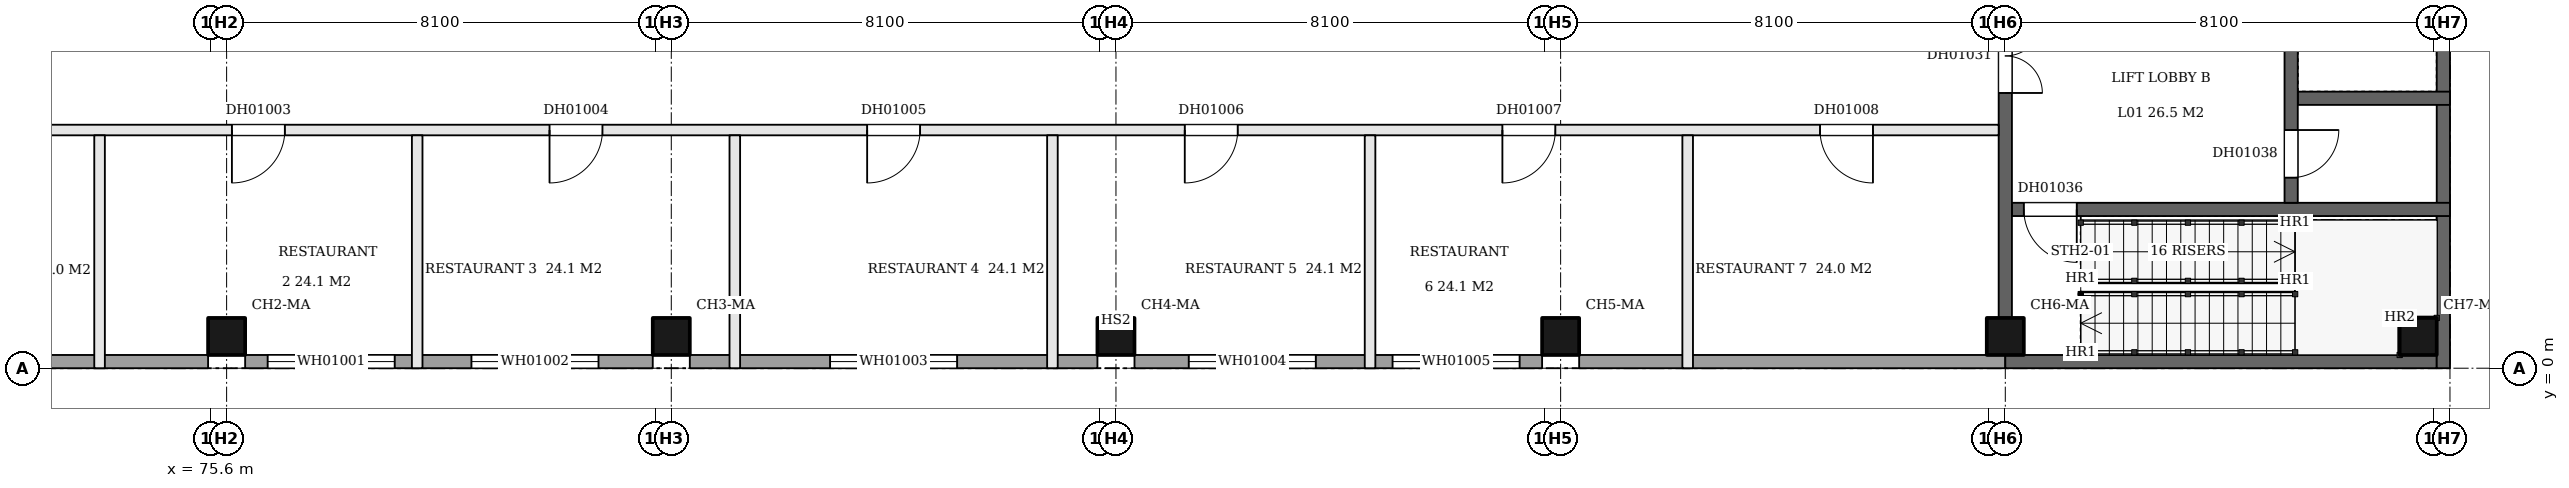
"""IFC4 building model, lengths in metres.
Left out: names, types, materials, properties, quantities, classifications, styles, units other than length and angle.
Written with IfcOpenShell. Run it as: python <this file> out.ifc"""

import sys

from ifc_helpers import new_model, si_unit, direction, frame, frame_2d, origin, origin_2d, place, context, subcontext, project, spatial, rectangle, extrude, element, fill, save


model = new_model("IFC4")
c1 = context("Model", 3, precision=1e-05, world=origin(), true_north=direction((0.0, 1.0)))
c2 = subcontext(c1, "Body", "Model", "MODEL_VIEW")
j1 = project(units=[si_unit("LENGTHUNIT", "METRE"), si_unit("PLANEANGLEUNIT", "RADIAN")], contexts=[c1])
p1 = place(None, origin())
s1 = spatial("IfcSite", under=j1, at=p1, CompositionType="ELEMENT")
p2 = place(p1, origin())
s2 = spatial("IfcBuilding", under=s1, at=p2, CompositionType="ELEMENT")
p3 = place(p2, frame((0.0, 0.0, 9.0)))
s3 = spatial("IfcBuildingStorey", under=s2, at=p3, CompositionType="ELEMENT", Elevation=9.0)
for number, where, z_axis, x_axis in (
    (1, (75.9, 0.6, 0.0), (0.0, 0.0, 1.0), (1.0, 0.0, 0.0)),
    (2, (84.3, 0.6, 0.0), (0.0, 0.0, 1.0), (1.0, 0.0, 0.0)),
    (3, (92.7, 0.6, 0.0), (0.0, 0.0, 1.0), (1.0, 0.0, 0.0)),
    (4, (101.1, 0.6, 0.0), (0.0, 0.0, 1.0), (1.0, 0.0, 0.0)),
    (5, (109.5, 0.6, 0.0), (0.0, 0.0, 1.0), (1.0, 0.0, 0.0)),
    (6, (117.3, 0.6, 0.0), (0.0, 0.0, 1.0), (1.0, 0.0, 0.0)),
):
    element("IfcColumn", number, at=place(p3, frame(where, z_axis=z_axis, x_axis=x_axis)), inside=s3, PredefinedType="COLUMN", context=c2, shape_type="SweptSolid", body=[
        extrude(rectangle(XDim=0.7, YDim=0.7, at=origin_2d()), origin(), (0.0, 0.0, 1.0), 5.1),
    ])
p4 = place(p3, frame((68.35, 0.125, 0.0), z_axis=(0.0, 0.0, 1.0), x_axis=(1.0, 0.0, 0.0)))
e7 = element("IfcWall", 7, at=p4, inside=s3, PredefinedType="SOLIDWALL", context=c2, shape_type="SweptSolid", body=[
    extrude(rectangle(XDim=7.2, YDim=0.25, at=frame_2d((3.6, 0.0))), origin(), (0.0, 0.0, 1.0), 5.1),
])
p5 = place(p3, frame((76.25, 0.125, 0.0), z_axis=(0.0, 0.0, 1.0), x_axis=(1.0, 0.0, 0.0)))
e8 = element("IfcWall", 8, at=p5, inside=s3, PredefinedType="SOLIDWALL", context=c2, shape_type="SweptSolid", body=[
    extrude(rectangle(XDim=7.7, YDim=0.25, at=frame_2d((3.85, 0.0))), origin(), (0.0, 0.0, 1.0), 5.1),
])
p6 = place(p5, frame((0.425, 0.0, 0.9)))
e9 = element("IfcOpeningElement", 9, at=p6, cuts=e8, PredefinedType="OPENING", context=c2, shape_type="SweptSolid", body=[
    extrude(rectangle(XDim=2.4, YDim=1.5, at=frame_2d((1.2, 0.75))), frame((0.0, 0.135, 0.0), z_axis=(0.0, -1.0, 0.0), x_axis=(1.0, 0.0, 0.0)), (0.0, 0.0, 1.0), 0.27),
])
p7 = place(p5, frame((4.275, 0.0, 0.9)))
e10 = element("IfcOpeningElement", 10, at=p7, cuts=e8, PredefinedType="OPENING", context=c2, shape_type="SweptSolid", body=[
    extrude(rectangle(XDim=2.4, YDim=1.5, at=frame_2d((1.2, 0.75))), frame((0.0, 0.135, 0.0), z_axis=(0.0, -1.0, 0.0), x_axis=(1.0, 0.0, 0.0)), (0.0, 0.0, 1.0), 0.27),
])
p8 = place(p3, frame((84.65, 0.125, 0.0), z_axis=(0.0, 0.0, 1.0), x_axis=(1.0, 0.0, 0.0)))
e11 = element("IfcWall", 11, at=p8, inside=s3, PredefinedType="SOLIDWALL", context=c2, shape_type="SweptSolid", body=[
    extrude(rectangle(XDim=7.7, YDim=0.25, at=frame_2d((3.85, 0.0))), origin(), (0.0, 0.0, 1.0), 5.1),
])
p9 = place(p8, frame((2.65, 0.0, 0.9)))
e12 = element("IfcOpeningElement", 12, at=p9, cuts=e11, PredefinedType="OPENING", context=c2, shape_type="SweptSolid", body=[
    extrude(rectangle(XDim=2.4, YDim=1.5, at=frame_2d((1.2, 0.75))), frame((0.0, 0.135, 0.0), z_axis=(0.0, -1.0, 0.0), x_axis=(1.0, 0.0, 0.0)), (0.0, 0.0, 1.0), 0.27),
])
p10 = place(p3, frame((93.05, 0.125, 0.0), z_axis=(0.0, 0.0, 1.0), x_axis=(1.0, 0.0, 0.0)))
e13 = element("IfcWall", 13, at=p10, inside=s3, PredefinedType="SOLIDWALL", context=c2, shape_type="SweptSolid", body=[
    extrude(rectangle(XDim=7.7, YDim=0.25, at=frame_2d((3.85, 0.0))), origin(), (0.0, 0.0, 1.0), 5.1),
])
p11 = place(p10, frame((1.025, 0.0, 0.9)))
e14 = element("IfcOpeningElement", 14, at=p11, cuts=e13, PredefinedType="OPENING", context=c2, shape_type="SweptSolid", body=[
    extrude(rectangle(XDim=2.4, YDim=1.5, at=frame_2d((1.2, 0.75))), frame((0.0, 0.135, 0.0), z_axis=(0.0, -1.0, 0.0), x_axis=(1.0, 0.0, 0.0)), (0.0, 0.0, 1.0), 0.27),
])
p12 = place(p10, frame((4.875, 0.0, 0.9)))
e15 = element("IfcOpeningElement", 15, at=p12, cuts=e13, PredefinedType="OPENING", context=c2, shape_type="SweptSolid", body=[
    extrude(rectangle(XDim=2.4, YDim=1.5, at=frame_2d((1.2, 0.75))), frame((0.0, 0.135, 0.0), z_axis=(0.0, -1.0, 0.0), x_axis=(1.0, 0.0, 0.0)), (0.0, 0.0, 1.0), 0.27),
])
p13 = place(p3, frame((101.45, 0.125, 0.0), z_axis=(0.0, 0.0, 1.0), x_axis=(1.0, 0.0, 0.0)))
e16 = element("IfcWall", 16, at=p13, inside=s3, PredefinedType="SOLIDWALL", context=c2, shape_type="SweptSolid", body=[
    extrude(rectangle(XDim=8.05, YDim=0.25, at=frame_2d((4.025, 0.0))), origin(), (0.0, 0.0, 1.0), 5.1),
])
p14 = place(p3, frame((109.5, 0.125, 0.0), z_axis=(0.0, 0.0, 1.0), x_axis=(1.0, 0.0, 0.0)))
e17 = element("IfcWall", 17, at=p14, inside=s3, PredefinedType="SHEAR", context=c2, shape_type="SweptSolid", body=[
    extrude(rectangle(XDim=8.15, YDim=0.25, at=frame_2d((4.075, 0.0))), origin(), (0.0, 0.0, 1.0), 5.1),
])
p15 = place(p3, frame((109.625, 3.0, 0.0), z_axis=(0.0, 0.0, 1.0), x_axis=(1.0, 0.0, 0.0)))
e18 = element("IfcWall", 18, at=p15, inside=s3, PredefinedType="SHEAR", context=c2, shape_type="SweptSolid", body=[
    extrude(rectangle(XDim=8.275, YDim=0.25, at=frame_2d((4.137, 0.0))), origin(), (0.0, 0.0, 1.0), 5.1),
])
p16 = place(p15, frame((0.225, 0.0, 0.0)))
e19 = element("IfcOpeningElement", 19, at=p16, cuts=e18, PredefinedType="OPENING", context=c2, shape_type="SweptSolid", body=[
    extrude(rectangle(XDim=1.0, YDim=2.1, at=frame_2d((0.5, 1.05))), frame((0.0, 0.135, 0.0), z_axis=(0.0, -1.0, 0.0), x_axis=(1.0, 0.0, 0.0)), (0.0, 0.0, 1.0), 0.27),
])
p17 = place(p3, frame((68.35, 4.5, 0.0), z_axis=(0.0, 0.0, 1.0), x_axis=(1.0, 0.0, 0.0)))
e20 = element("IfcWall", 20, at=p17, inside=s3, PredefinedType="PARTITIONING", context=c2, shape_type="SweptSolid", body=[
    extrude(rectangle(XDim=41.025, YDim=0.2, at=frame_2d((20.512, 0.0))), origin(), (0.0, 0.0, 1.0), 5.1),
])
p18 = place(p17, frame((1.65, 0.0, 0.0)))
e21 = element("IfcOpeningElement", 21, at=p18, cuts=e20, PredefinedType="OPENING", context=c2, shape_type="SweptSolid", body=[
    extrude(rectangle(XDim=1.0, YDim=2.1, at=frame_2d((0.5, 1.05))), frame((0.0, 0.11, 0.0), z_axis=(0.0, -1.0, 0.0), x_axis=(1.0, 0.0, 0.0)), (0.0, 0.0, 1.0), 0.22),
])
p19 = place(p17, frame((7.65, 0.0, 0.0)))
e22 = element("IfcOpeningElement", 22, at=p19, cuts=e20, PredefinedType="OPENING", context=c2, shape_type="SweptSolid", body=[
    extrude(rectangle(XDim=1.0, YDim=2.1, at=frame_2d((0.5, 1.05))), frame((0.0, 0.11, 0.0), z_axis=(0.0, -1.0, 0.0), x_axis=(1.0, 0.0, 0.0)), (0.0, 0.0, 1.0), 0.22),
])
p20 = place(p17, frame((13.65, 0.0, 0.0)))
e23 = element("IfcOpeningElement", 23, at=p20, cuts=e20, PredefinedType="OPENING", context=c2, shape_type="SweptSolid", body=[
    extrude(rectangle(XDim=1.0, YDim=2.1, at=frame_2d((0.5, 1.05))), frame((0.0, 0.11, 0.0), z_axis=(0.0, -1.0, 0.0), x_axis=(1.0, 0.0, 0.0)), (0.0, 0.0, 1.0), 0.22),
])
p21 = place(p17, frame((19.65, 0.0, 0.0)))
e24 = element("IfcOpeningElement", 24, at=p21, cuts=e20, PredefinedType="OPENING", context=c2, shape_type="SweptSolid", body=[
    extrude(rectangle(XDim=1.0, YDim=2.1, at=frame_2d((0.5, 1.05))), frame((0.0, 0.11, 0.0), z_axis=(0.0, -1.0, 0.0), x_axis=(1.0, 0.0, 0.0)), (0.0, 0.0, 1.0), 0.22),
])
p22 = place(p17, frame((25.65, 0.0, 0.0)))
e25 = element("IfcOpeningElement", 25, at=p22, cuts=e20, PredefinedType="OPENING", context=c2, shape_type="SweptSolid", body=[
    extrude(rectangle(XDim=1.0, YDim=2.1, at=frame_2d((0.5, 1.05))), frame((0.0, 0.11, 0.0), z_axis=(0.0, -1.0, 0.0), x_axis=(1.0, 0.0, 0.0)), (0.0, 0.0, 1.0), 0.22),
])
p23 = place(p17, frame((31.65, 0.0, 0.0)))
e26 = element("IfcOpeningElement", 26, at=p23, cuts=e20, PredefinedType="OPENING", context=c2, shape_type="SweptSolid", body=[
    extrude(rectangle(XDim=1.0, YDim=2.1, at=frame_2d((0.5, 1.05))), frame((0.0, 0.11, 0.0), z_axis=(0.0, -1.0, 0.0), x_axis=(1.0, 0.0, 0.0)), (0.0, 0.0, 1.0), 0.22),
])
p24 = place(p17, frame((37.65, 0.0, 0.0)))
e27 = element("IfcOpeningElement", 27, at=p24, cuts=e20, PredefinedType="OPENING", context=c2, shape_type="SweptSolid", body=[
    extrude(rectangle(XDim=1.0, YDim=2.1, at=frame_2d((0.5, 1.05))), frame((0.0, 0.11, 0.0), z_axis=(0.0, -1.0, 0.0), x_axis=(1.0, 0.0, 0.0)), (0.0, 0.0, 1.0), 0.22),
])
p25 = place(p3, frame((115.025, 5.1, 0.0), z_axis=(0.0, 0.0, 1.0), x_axis=(1.0, 0.0, 0.0)))
e28 = element("IfcWall", 28, at=p25, inside=s3, PredefinedType="SHEAR", context=c2, shape_type="SweptSolid", body=[
    extrude(rectangle(XDim=2.875, YDim=0.25, at=frame_2d((1.438, 0.0))), origin(), (0.0, 0.0, 1.0), 5.1),
])
for number, where, z_axis, x_axis in (
    (29, (73.5, 0.0, 0.0), (0.0, 0.0, 1.0), (0.0, 1.0, 0.0)),
    (30, (79.5, 0.0, 0.0), (0.0, 0.0, 1.0), (0.0, 1.0, 0.0)),
    (31, (85.5, 0.0, 0.0), (0.0, 0.0, 1.0), (0.0, 1.0, 0.0)),
    (32, (91.5, 0.0, 0.0), (0.0, 0.0, 1.0), (0.0, 1.0, 0.0)),
    (33, (97.5, 0.0, 0.0), (0.0, 0.0, 1.0), (0.0, 1.0, 0.0)),
    (34, (103.5, 0.0, 0.0), (0.0, 0.0, 1.0), (0.0, 1.0, 0.0)),
):
    element("IfcWall", number, at=place(p3, frame(where, z_axis=z_axis, x_axis=x_axis)), inside=s3, PredefinedType="PARTITIONING", context=c2, shape_type="SweptSolid", body=[
        extrude(rectangle(XDim=4.4, YDim=0.2, at=frame_2d((2.2, 0.0))), origin(), (0.0, 0.0, 1.0), 5.1),
    ])
p26 = place(p3, frame((109.5, 0.95, 0.0), z_axis=(0.0, 0.0, 1.0), x_axis=(0.0, 1.0, 0.0)))
e35 = element("IfcWall", 35, at=p26, inside=s3, PredefinedType="SHEAR", context=c2, shape_type="SweptSolid", body=[
    extrude(rectangle(XDim=7.1, YDim=0.25, at=frame_2d((3.55, 0.0))), origin(), (0.0, 0.0, 1.0), 5.1),
])
p27 = place(p26, frame((4.25, 0.0, 0.0)))
e36 = element("IfcOpeningElement", 36, at=p27, cuts=e35, PredefinedType="OPENING", context=c2, shape_type="SweptSolid", body=[
    extrude(rectangle(XDim=1.4, YDim=2.1, at=frame_2d((0.7, 1.05))), frame((0.0, 0.135, 0.0), z_axis=(0.0, -1.0, 0.0), x_axis=(1.0, 0.0, 0.0)), (0.0, 0.0, 1.0), 0.27),
])
p28 = place(p3, frame((114.9, 3.125, 0.0), z_axis=(0.0, 0.0, 1.0), x_axis=(0.0, 1.0, 0.0)))
e37 = element("IfcWall", 37, at=p28, inside=s3, PredefinedType="SHEAR", context=c2, shape_type="SweptSolid", body=[
    extrude(rectangle(XDim=5.15, YDim=0.25, at=frame_2d((2.575, 0.0))), origin(), (0.0, 0.0, 1.0), 5.1),
])
p29 = place(p28, frame((3.075, 0.0, 0.0)))
e38 = element("IfcOpeningElement", 38, at=p29, cuts=e37, PredefinedType="OPENING", context=c2, shape_type="SweptSolid", body=[
    extrude(rectangle(XDim=1.1, YDim=2.1, at=frame_2d((0.55, 1.05))), frame((0.0, 0.135, 0.0), z_axis=(0.0, -1.0, 0.0), x_axis=(1.0, 0.0, 0.0)), (0.0, 0.0, 1.0), 0.27),
])
p30 = place(p28, frame((0.475, 0.0, 0.0)))
e39 = element("IfcOpeningElement", 39, at=p30, cuts=e37, PredefinedType="OPENING", context=c2, shape_type="SweptSolid", body=[
    extrude(rectangle(XDim=0.9, YDim=2.1, at=frame_2d((0.45, 1.05))), frame((0.0, 0.135, 0.0), z_axis=(0.0, -1.0, 0.0), x_axis=(1.0, 0.0, 0.0)), (0.0, 0.0, 1.0), 0.27),
])
p31 = place(p3, frame((117.775, 0.0, 0.0), z_axis=(0.0, 0.0, 1.0), x_axis=(0.0, 1.0, 0.0)))
e40 = element("IfcWall", 40, at=p31, inside=s3, PredefinedType="SHEAR", context=c2, shape_type="SweptSolid", body=[
    extrude(rectangle(XDim=8.4, YDim=0.25, at=frame_2d((4.2, 0.0))), origin(), (0.0, 0.0, 1.0), 5.1),
])
p32 = place(p19, frame((1.0, 0.0, 0.0), z_axis=(0.0, 0.0, 1.0), x_axis=(-1.0, 0.0, 0.0)))
e41 = element("IfcDoor", 41, at=p32, inside=s3, OperationType="SINGLE_SWING_RIGHT", PredefinedType="DOOR", context=c2, shape_type="SweptSolid", body=[
    extrude(rectangle(XDim=1.0, YDim=2.1, at=frame_2d((0.5, 1.05))), frame((0.0, 0.025, 0.0), z_axis=(0.0, -1.0, 0.0), x_axis=(1.0, 0.0, 0.0)), (0.0, 0.0, 1.0), 0.05),
])
fill(e22, e41)
p33 = place(p20, frame((1.0, 0.0, 0.0), z_axis=(0.0, 0.0, 1.0), x_axis=(-1.0, 0.0, 0.0)))
e42 = element("IfcDoor", 42, at=p33, inside=s3, OperationType="SINGLE_SWING_RIGHT", PredefinedType="DOOR", context=c2, shape_type="SweptSolid", body=[
    extrude(rectangle(XDim=1.0, YDim=2.1, at=frame_2d((0.5, 1.05))), frame((0.0, 0.025, 0.0), z_axis=(0.0, -1.0, 0.0), x_axis=(1.0, 0.0, 0.0)), (0.0, 0.0, 1.0), 0.05),
])
fill(e23, e42)
p34 = place(p21, frame((1.0, 0.0, 0.0), z_axis=(0.0, 0.0, 1.0), x_axis=(-1.0, 0.0, 0.0)))
e43 = element("IfcDoor", 43, at=p34, inside=s3, OperationType="SINGLE_SWING_RIGHT", PredefinedType="DOOR", context=c2, shape_type="SweptSolid", body=[
    extrude(rectangle(XDim=1.0, YDim=2.1, at=frame_2d((0.5, 1.05))), frame((0.0, 0.025, 0.0), z_axis=(0.0, -1.0, 0.0), x_axis=(1.0, 0.0, 0.0)), (0.0, 0.0, 1.0), 0.05),
])
fill(e24, e43)
p35 = place(p22, frame((1.0, 0.0, 0.0), z_axis=(0.0, 0.0, 1.0), x_axis=(-1.0, 0.0, 0.0)))
e44 = element("IfcDoor", 44, at=p35, inside=s3, OperationType="SINGLE_SWING_RIGHT", PredefinedType="DOOR", context=c2, shape_type="SweptSolid", body=[
    extrude(rectangle(XDim=1.0, YDim=2.1, at=frame_2d((0.5, 1.05))), frame((0.0, 0.025, 0.0), z_axis=(0.0, -1.0, 0.0), x_axis=(1.0, 0.0, 0.0)), (0.0, 0.0, 1.0), 0.05),
])
fill(e25, e44)
p36 = place(p23, frame((1.0, 0.0, 0.0), z_axis=(0.0, 0.0, 1.0), x_axis=(-1.0, 0.0, 0.0)))
e45 = element("IfcDoor", 45, at=p36, inside=s3, OperationType="SINGLE_SWING_RIGHT", PredefinedType="DOOR", context=c2, shape_type="SweptSolid", body=[
    extrude(rectangle(XDim=1.0, YDim=2.1, at=frame_2d((0.5, 1.05))), frame((0.0, 0.025, 0.0), z_axis=(0.0, -1.0, 0.0), x_axis=(1.0, 0.0, 0.0)), (0.0, 0.0, 1.0), 0.05),
])
fill(e26, e45)
p37 = place(p24, frame((1.0, 0.0, 0.0), z_axis=(0.0, 0.0, 1.0), x_axis=(-1.0, 0.0, 0.0)))
e46 = element("IfcDoor", 46, at=p37, inside=s3, OperationType="SINGLE_SWING_LEFT", PredefinedType="DOOR", context=c2, shape_type="SweptSolid", body=[
    extrude(rectangle(XDim=1.0, YDim=2.1, at=frame_2d((0.5, 1.05))), frame((0.0, 0.025, 0.0), z_axis=(0.0, -1.0, 0.0), x_axis=(1.0, 0.0, 0.0)), (0.0, 0.0, 1.0), 0.05),
])
fill(e27, e46)
p38 = place(p27, frame((1.4, 0.0, 0.0), z_axis=(0.0, 0.0, 1.0), x_axis=(-1.0, 0.0, 0.0)))
e47 = element("IfcDoor", 47, at=p38, inside=s3, OperationType="DOUBLE_DOOR_SINGLE_SWING", PredefinedType="DOOR", context=c2, shape_type="SweptSolid", body=[
    extrude(rectangle(XDim=1.4, YDim=2.1, at=frame_2d((0.7, 1.05))), frame((0.0, 0.025, 0.0), z_axis=(0.0, -1.0, 0.0), x_axis=(1.0, 0.0, 0.0)), (0.0, 0.0, 1.0), 0.05),
])
fill(e36, e47)
p39 = place(p16, frame((1.0, 0.0, 0.0), z_axis=(0.0, 0.0, 1.0), x_axis=(-1.0, 0.0, 0.0)))
e48 = element("IfcDoor", 48, at=p39, inside=s3, OperationType="SINGLE_SWING_LEFT", PredefinedType="DOOR", context=c2, shape_type="SweptSolid", body=[
    extrude(rectangle(XDim=1.0, YDim=2.1, at=frame_2d((0.5, 1.05))), frame((0.0, 0.025, 0.0), z_axis=(0.0, -1.0, 0.0), x_axis=(1.0, 0.0, 0.0)), (0.0, 0.0, 1.0), 0.05),
])
fill(e19, e48)
p40 = place(p30, frame((0.9, 0.0, 0.0), z_axis=(0.0, 0.0, 1.0), x_axis=(-1.0, 0.0, 0.0)))
e49 = element("IfcDoor", 49, at=p40, inside=s3, OperationType="SINGLE_SWING_LEFT", PredefinedType="DOOR", context=c2, shape_type="SweptSolid", body=[
    extrude(rectangle(XDim=0.9, YDim=2.1, at=frame_2d((0.45, 1.05))), frame((0.0, 0.025, 0.0), z_axis=(0.0, -1.0, 0.0), x_axis=(1.0, 0.0, 0.0)), (0.0, 0.0, 1.0), 0.05),
])
fill(e39, e49)
p41 = place(p6, origin())
e50 = element("IfcWindow", 50, at=p41, inside=s3, PartitioningType="DOUBLE_PANEL_VERTICAL", PredefinedType="WINDOW", context=c2, shape_type="SweptSolid", body=[
    extrude(rectangle(XDim=2.4, YDim=1.5, at=frame_2d((1.2, 0.75))), frame((0.0, 0.03, 0.0), z_axis=(0.0, -1.0, 0.0), x_axis=(1.0, 0.0, 0.0)), (0.0, 0.0, 1.0), 0.06),
])
fill(e9, e50)
p42 = place(p7, origin())
e51 = element("IfcWindow", 51, at=p42, inside=s3, PartitioningType="DOUBLE_PANEL_VERTICAL", PredefinedType="WINDOW", context=c2, shape_type="SweptSolid", body=[
    extrude(rectangle(XDim=2.4, YDim=1.5, at=frame_2d((1.2, 0.75))), frame((0.0, 0.03, 0.0), z_axis=(0.0, -1.0, 0.0), x_axis=(1.0, 0.0, 0.0)), (0.0, 0.0, 1.0), 0.06),
])
fill(e10, e51)
p43 = place(p9, origin())
e52 = element("IfcWindow", 52, at=p43, inside=s3, PartitioningType="DOUBLE_PANEL_VERTICAL", PredefinedType="WINDOW", context=c2, shape_type="SweptSolid", body=[
    extrude(rectangle(XDim=2.4, YDim=1.5, at=frame_2d((1.2, 0.75))), frame((0.0, 0.03, 0.0), z_axis=(0.0, -1.0, 0.0), x_axis=(1.0, 0.0, 0.0)), (0.0, 0.0, 1.0), 0.06),
])
fill(e12, e52)
p44 = place(p11, origin())
e53 = element("IfcWindow", 53, at=p44, inside=s3, PartitioningType="DOUBLE_PANEL_VERTICAL", PredefinedType="WINDOW", context=c2, shape_type="SweptSolid", body=[
    extrude(rectangle(XDim=2.4, YDim=1.5, at=frame_2d((1.2, 0.75))), frame((0.0, 0.03, 0.0), z_axis=(0.0, -1.0, 0.0), x_axis=(1.0, 0.0, 0.0)), (0.0, 0.0, 1.0), 0.06),
])
fill(e14, e53)
p45 = place(p12, origin())
e54 = element("IfcWindow", 54, at=p45, inside=s3, PartitioningType="DOUBLE_PANEL_VERTICAL", PredefinedType="WINDOW", context=c2, shape_type="SweptSolid", body=[
    extrude(rectangle(XDim=2.4, YDim=1.5, at=frame_2d((1.2, 0.75))), frame((0.0, 0.03, 0.0), z_axis=(0.0, -1.0, 0.0), x_axis=(1.0, 0.0, 0.0)), (0.0, 0.0, 1.0), 0.06),
])
fill(e15, e54)
save(model, sys.argv[1])
